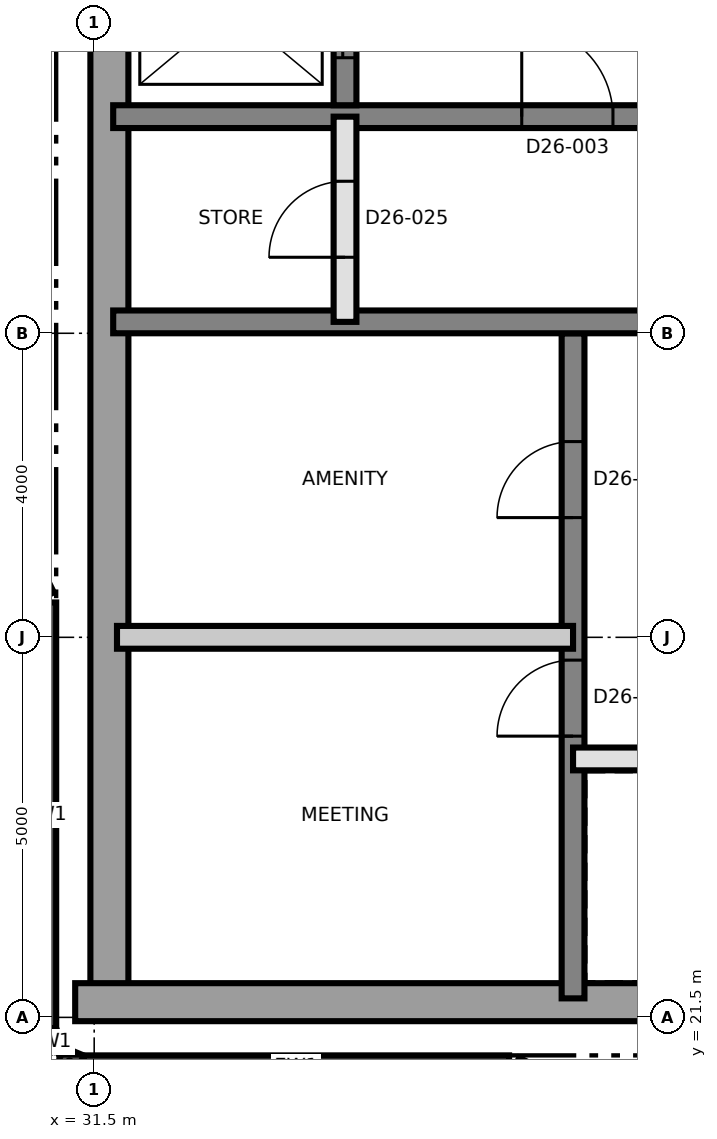
"""IFC4 building model, lengths in metres.
Left out: names, types, materials, properties, quantities, classifications, styles, units other than length and angle.
Written with IfcOpenShell. Run it as: python <this file> out.ifc"""

import sys

from ifc_helpers import new_model, si_unit, direction, frame, frame_2d, origin, place, context, subcontext, project, spatial, rectangle, extrude, element, fill, save


model = new_model("IFC4")
c1 = context("Model", 3, precision=1e-05, world=origin(), true_north=direction((0.0, 1.0)))
c2 = subcontext(c1, "Body", "Model", "MODEL_VIEW")
j1 = project(units=[si_unit("LENGTHUNIT", "METRE"), si_unit("PLANEANGLEUNIT", "RADIAN")], contexts=[c1])
p1 = place(None, origin())
s1 = spatial("IfcSite", under=j1, at=p1, CompositionType="ELEMENT")
p2 = place(p1, origin())
s2 = spatial("IfcBuilding", under=s1, at=p2, CompositionType="ELEMENT")
p3 = place(p2, frame((0.0, 0.0, 240.2)))
s3 = spatial("IfcBuildingStorey", under=s2, at=p3, CompositionType="ELEMENT", Elevation=240.2)
p4 = place(p3, frame((31.7, 21.75, 0.0), z_axis=(0.0, 0.0, 1.0), x_axis=(0.0, 1.0, 0.0)))
e1 = element("IfcWall", 1, at=p4, inside=s3, PredefinedType="SHEAR", context=c2, shape_type="SweptSolid", body=[
    extrude(rectangle(XDim=17.5, YDim=0.5, at=frame_2d((8.75, 0.0))), origin(), (0.0, 0.0, 1.0), 3.7),
])
p5 = place(p3, frame((31.25, 21.7, 0.0), z_axis=(0.0, 0.0, 1.0), x_axis=(1.0, 0.0, 0.0)))
e2 = element("IfcWall", 2, at=p5, inside=s3, PredefinedType="SHEAR", context=c2, shape_type="SweptSolid", body=[
    extrude(rectangle(XDim=27.0, YDim=0.5, at=frame_2d((13.5, 0.0))), origin(), (0.0, 0.0, 1.0), 3.7),
])
p6 = place(p3, frame((37.8, 21.75, 0.0), z_axis=(0.0, 0.0, 1.0), x_axis=(0.0, 1.0, 0.0)))
e3 = element("IfcWall", 3, at=p6, inside=s3, PredefinedType="SHEAR", context=c2, shape_type="SweptSolid", body=[
    extrude(rectangle(XDim=8.75, YDim=0.3, at=frame_2d((4.375, 0.0))), origin(), (0.0, 0.0, 1.0), 3.7),
])
p7 = place(p6, frame((6.325, 0.0, 0.0)))
e4 = element("IfcOpeningElement", 4, at=p7, cuts=e3, PredefinedType="OPENING", context=c2, shape_type="SweptSolid", body=[
    extrude(rectangle(XDim=1.0, YDim=2.1, at=frame_2d((0.5, 1.05))), frame((0.0, 0.16, 0.0), z_axis=(0.0, -1.0, 0.0), x_axis=(1.0, 0.0, 0.0)), (0.0, 0.0, 1.0), 0.32),
])
p8 = place(p6, frame((3.45, 0.0, 0.0)))
e5 = element("IfcOpeningElement", 5, at=p8, cuts=e3, PredefinedType="OPENING", context=c2, shape_type="SweptSolid", body=[
    extrude(rectangle(XDim=1.0, YDim=2.1, at=frame_2d((0.5, 1.05))), frame((0.0, 0.16, 0.0), z_axis=(0.0, -1.0, 0.0), x_axis=(1.0, 0.0, 0.0)), (0.0, 0.0, 1.0), 0.32),
])
p9 = place(p3, frame((31.75, 30.65, 0.0), z_axis=(0.0, 0.0, 1.0), x_axis=(1.0, 0.0, 0.0)))
e6 = element("IfcWall", 6, at=p9, inside=s3, PredefinedType="SHEAR", context=c2, shape_type="SweptSolid", body=[
    extrude(rectangle(XDim=26.5, YDim=0.3, at=frame_2d((13.25, 0.0))), origin(), (0.0, 0.0, 1.0), 3.7),
])
p10 = place(p9, frame((24.75, 0.0, 0.0)))
e7 = element("IfcOpeningElement", 7, at=p10, cuts=e6, PredefinedType="OPENING", context=c2, shape_type="SweptSolid", body=[
    extrude(rectangle(XDim=1.0, YDim=2.1, at=frame_2d((0.5, 1.05))), frame((0.0, 0.16, 0.0), z_axis=(0.0, -1.0, 0.0), x_axis=(1.0, 0.0, 0.0)), (0.0, 0.0, 1.0), 0.32),
])
p11 = place(p3, frame((31.75, 33.35, 0.0), z_axis=(0.0, 0.0, 1.0), x_axis=(1.0, 0.0, 0.0)))
e8 = element("IfcWall", 8, at=p11, inside=s3, PredefinedType="SHEAR", context=c2, shape_type="SweptSolid", body=[
    extrude(rectangle(XDim=26.5, YDim=0.3, at=frame_2d((13.25, 0.0))), origin(), (0.0, 0.0, 1.0), 3.7),
])
p12 = place(p11, frame((13.9, 0.0, 0.0)))
e9 = element("IfcOpeningElement", 9, at=p12, cuts=e8, PredefinedType="OPENING", context=c2, shape_type="SweptSolid", body=[
    extrude(rectangle(XDim=1.4, YDim=2.1, at=frame_2d((0.7, 1.05))), frame((0.0, 0.16, 0.0), z_axis=(0.0, -1.0, 0.0), x_axis=(1.0, 0.0, 0.0)), (0.0, 0.0, 1.0), 0.32),
])
p13 = place(p11, frame((5.375, 0.0, 0.0)))
e10 = element("IfcOpeningElement", 10, at=p13, cuts=e8, PredefinedType="OPENING", context=c2, shape_type="SweptSolid", body=[
    extrude(rectangle(XDim=1.2, YDim=2.1, at=frame_2d((0.6, 1.05))), frame((0.0, 0.16, 0.0), z_axis=(0.0, -1.0, 0.0), x_axis=(1.0, 0.0, 0.0)), (0.0, 0.0, 1.0), 0.32),
])
p14 = place(p11, frame((19.925, 0.0, 0.0)))
e11 = element("IfcOpeningElement", 11, at=p14, cuts=e8, PredefinedType="OPENING", context=c2, shape_type="SweptSolid", body=[
    extrude(rectangle(XDim=1.2, YDim=2.1, at=frame_2d((0.6, 1.05))), frame((0.0, 0.16, 0.0), z_axis=(0.0, -1.0, 0.0), x_axis=(1.0, 0.0, 0.0)), (0.0, 0.0, 1.0), 0.32),
])
p15 = place(p3, frame((34.8, 33.5, 0.0), z_axis=(0.0, 0.0, 1.0), x_axis=(0.0, 1.0, 0.0)))
e12 = element("IfcWall", 12, at=p15, inside=s3, PredefinedType="SHEAR", context=c2, shape_type="SweptSolid", body=[
    extrude(rectangle(XDim=2.55, YDim=0.3, at=frame_2d((1.275, 0.0))), origin(), (0.0, 0.0, 1.0), 3.7),
])
p16 = place(p15, frame((0.625, 0.0, 0.0)))
e13 = element("IfcOpeningElement", 13, at=p16, cuts=e12, PredefinedType="OPENING", context=c2, shape_type="SweptSolid", body=[
    extrude(rectangle(XDim=1.3, YDim=2.4, at=frame_2d((0.65, 1.2))), frame((0.0, 0.16, 0.0), z_axis=(0.0, -1.0, 0.0), x_axis=(1.0, 0.0, 0.0)), (0.0, 0.0, 1.0), 0.32),
])
p17 = place(p3, frame((30.85, 26.959, 0.0), z_axis=(0.0, 0.0, 1.0), x_axis=(0.0, -1.0, 0.0)))
e14 = element("IfcWall", 14, at=p17, inside=s3, PredefinedType="SOLIDWALL", context=c2, shape_type="SweptSolid", body=[
    extrude(rectangle(XDim=5.599, YDim=0.3, at=frame_2d((2.8, 0.0))), origin(), (0.0, 0.0, 1.0), 3.4),
])
for number, where, z_axis, x_axis in (
    (15, (30.861, 21.302, 0.0), (0.0, 0.0, 1.0), (0.383, -0.924, 0.0)),
    (16, (31.048, 20.967, 0.0), (0.0, 0.0, 1.0), (0.924, -0.383, 0.0)),
):
    element("IfcWall", number, at=place(p3, frame(where, z_axis=z_axis, x_axis=x_axis)), inside=s3, PredefinedType="SOLIDWALL", context=c2, shape_type="SweptSolid", body=[
        extrude(rectangle(XDim=0.275, YDim=0.3, at=frame_2d((0.138, 0.0))), origin(), (0.0, 0.0, 1.0), 3.4),
    ])
p18 = place(p3, frame((31.36, 20.85, 0.0), z_axis=(0.0, 0.0, 1.0), x_axis=(1.0, 0.0, 0.0)))
e17 = element("IfcWall", 17, at=p18, inside=s3, PredefinedType="SOLIDWALL", context=c2, shape_type="SweptSolid", body=[
    extrude(rectangle(XDim=5.599, YDim=0.3, at=frame_2d((2.8, 0.0))), origin(), (0.0, 0.0, 1.0), 3.4),
])
for number, where, z_axis, x_axis in (
    (18, (37.025, 20.834, 0.0), (0.0, 0.0, 1.0), (0.897, -0.442, 0.0)),
    (19, (30.216, 28.28, 0.0), (0.0, 0.0, 1.0), (0.442, -0.897, 0.0)),
):
    element("IfcWall", number, at=place(p3, frame(where, z_axis=z_axis, x_axis=x_axis)), inside=s3, PredefinedType="SOLIDWALL", context=c2, shape_type="SweptSolid", body=[
        extrude(rectangle(XDim=1.399, YDim=0.3, at=frame_2d((0.7, 0.0))), origin(), (0.0, 0.0, 1.0), 3.4),
    ])
p19 = place(p3, frame((37.8, 24.9, 0.0), z_axis=(0.0, 0.0, 1.0), x_axis=(1.0, 0.0, 0.0)))
e20 = element("IfcWall", 20, at=p19, inside=s3, PredefinedType="SOLIDWALL", context=c2, shape_type="SweptSolid", body=[
    extrude(rectangle(XDim=12.0, YDim=0.3, at=frame_2d((6.0, 0.0))), origin(), (0.0, 0.0, 1.0), 3.4),
])
p20 = place(p19, frame((1.05, 0.0, 0.0)))
e21 = element("IfcOpeningElement", 21, at=p20, cuts=e20, PredefinedType="OPENING", context=c2, shape_type="SweptSolid", body=[
    extrude(rectangle(XDim=0.9, YDim=2.1, at=frame_2d((0.45, 1.05))), frame((0.0, 0.16, 0.0), z_axis=(0.0, -1.0, 0.0), x_axis=(1.0, 0.0, 0.0)), (0.0, 0.0, 1.0), 0.32),
])
p21 = place(p19, frame((10.05, 0.0, 0.0)))
e22 = element("IfcOpeningElement", 22, at=p21, cuts=e20, PredefinedType="OPENING", context=c2, shape_type="SweptSolid", body=[
    extrude(rectangle(XDim=0.9, YDim=2.1, at=frame_2d((0.45, 1.05))), frame((0.0, 0.16, 0.0), z_axis=(0.0, -1.0, 0.0), x_axis=(1.0, 0.0, 0.0)), (0.0, 0.0, 1.0), 0.32),
])
p22 = place(p19, frame((3.95, 0.0, 0.0)))
e23 = element("IfcOpeningElement", 23, at=p22, cuts=e20, PredefinedType="OPENING", context=c2, shape_type="SweptSolid", body=[
    extrude(rectangle(XDim=1.1, YDim=2.4, at=frame_2d((0.55, 1.2))), frame((0.0, 0.16, 0.0), z_axis=(0.0, -1.0, 0.0), x_axis=(1.0, 0.0, 0.0)), (0.0, 0.0, 1.0), 0.32),
])
p23 = place(p19, frame((6.95, 0.0, 0.0)))
e24 = element("IfcOpeningElement", 24, at=p23, cuts=e20, PredefinedType="OPENING", context=c2, shape_type="SweptSolid", body=[
    extrude(rectangle(XDim=1.1, YDim=2.4, at=frame_2d((0.55, 1.2))), frame((0.0, 0.16, 0.0), z_axis=(0.0, -1.0, 0.0), x_axis=(1.0, 0.0, 0.0)), (0.0, 0.0, 1.0), 0.32),
])
p24 = place(p3, frame((31.8, 26.5, 0.0), z_axis=(0.0, 0.0, 1.0), x_axis=(1.0, 0.0, 0.0)))
e25 = element("IfcWall", 25, at=p24, inside=s3, PredefinedType="PARTITIONING", context=c2, shape_type="SweptSolid", body=[
    extrude(rectangle(XDim=6.0, YDim=0.3, at=frame_2d((3.0, 0.0))), origin(), (0.0, 0.0, 1.0), 3.4),
])
p25 = place(p3, frame((34.8, 30.65, 0.0), z_axis=(0.0, 0.0, 1.0), x_axis=(0.0, 1.0, 0.0)))
e26 = element("IfcWall", 26, at=p25, inside=s3, PredefinedType="SOLIDWALL", context=c2, shape_type="SweptSolid", body=[
    extrude(rectangle(XDim=2.7, YDim=0.3, at=frame_2d((1.35, 0.0))), origin(), (0.0, 0.0, 1.0), 3.4),
])
p26 = place(p25, frame((0.85, 0.0, 0.0)))
e27 = element("IfcOpeningElement", 27, at=p26, cuts=e26, PredefinedType="OPENING", context=c2, shape_type="SweptSolid", body=[
    extrude(rectangle(XDim=1.0, YDim=2.1, at=frame_2d((0.5, 1.05))), frame((0.0, 0.16, 0.0), z_axis=(0.0, -1.0, 0.0), x_axis=(1.0, 0.0, 0.0)), (0.0, 0.0, 1.0), 0.32),
])
p27 = place(p13, origin())
e28 = element("IfcDoor", 28, at=p27, inside=s3, OperationType="SINGLE_SWING_LEFT", PredefinedType="DOOR", context=c2, shape_type="SweptSolid", body=[
    extrude(rectangle(XDim=1.2, YDim=2.1, at=frame_2d((0.6, 1.05))), frame((0.0, 0.025, 0.0), z_axis=(0.0, -1.0, 0.0), x_axis=(1.0, 0.0, 0.0)), (0.0, 0.0, 1.0), 0.05),
])
fill(e10, e28)
p28 = place(p16, origin())
e29 = element("IfcDoor", 29, at=p28, inside=s3, OperationType="SLIDING_TO_LEFT", PredefinedType="DOOR", context=c2, shape_type="SweptSolid", body=[
    extrude(rectangle(XDim=1.3, YDim=2.4, at=frame_2d((0.65, 1.2))), frame((0.0, 0.025, 0.0), z_axis=(0.0, -1.0, 0.0), x_axis=(1.0, 0.0, 0.0)), (0.0, 0.0, 1.0), 0.05),
])
fill(e13, e29)
p29 = place(p7, origin())
e30 = element("IfcDoor", 30, at=p29, inside=s3, OperationType="SINGLE_SWING_LEFT", PredefinedType="DOOR", context=c2, shape_type="SweptSolid", body=[
    extrude(rectangle(XDim=1.0, YDim=2.1, at=frame_2d((0.5, 1.05))), frame((0.0, 0.025, 0.0), z_axis=(0.0, -1.0, 0.0), x_axis=(1.0, 0.0, 0.0)), (0.0, 0.0, 1.0), 0.05),
])
fill(e4, e30)
p30 = place(p8, origin())
e31 = element("IfcDoor", 31, at=p30, inside=s3, OperationType="SINGLE_SWING_RIGHT", PredefinedType="DOOR", context=c2, shape_type="SweptSolid", body=[
    extrude(rectangle(XDim=1.0, YDim=2.1, at=frame_2d((0.5, 1.05))), frame((0.0, 0.025, 0.0), z_axis=(0.0, -1.0, 0.0), x_axis=(1.0, 0.0, 0.0)), (0.0, 0.0, 1.0), 0.05),
])
fill(e5, e31)
p31 = place(p26, origin())
e32 = element("IfcDoor", 32, at=p31, inside=s3, OperationType="SINGLE_SWING_LEFT", PredefinedType="DOOR", context=c2, shape_type="SweptSolid", body=[
    extrude(rectangle(XDim=1.0, YDim=2.1, at=frame_2d((0.5, 1.05))), frame((0.0, 0.025, 0.0), z_axis=(0.0, -1.0, 0.0), x_axis=(1.0, 0.0, 0.0)), (0.0, 0.0, 1.0), 0.05),
])
fill(e27, e32)
save(model, sys.argv[1])
